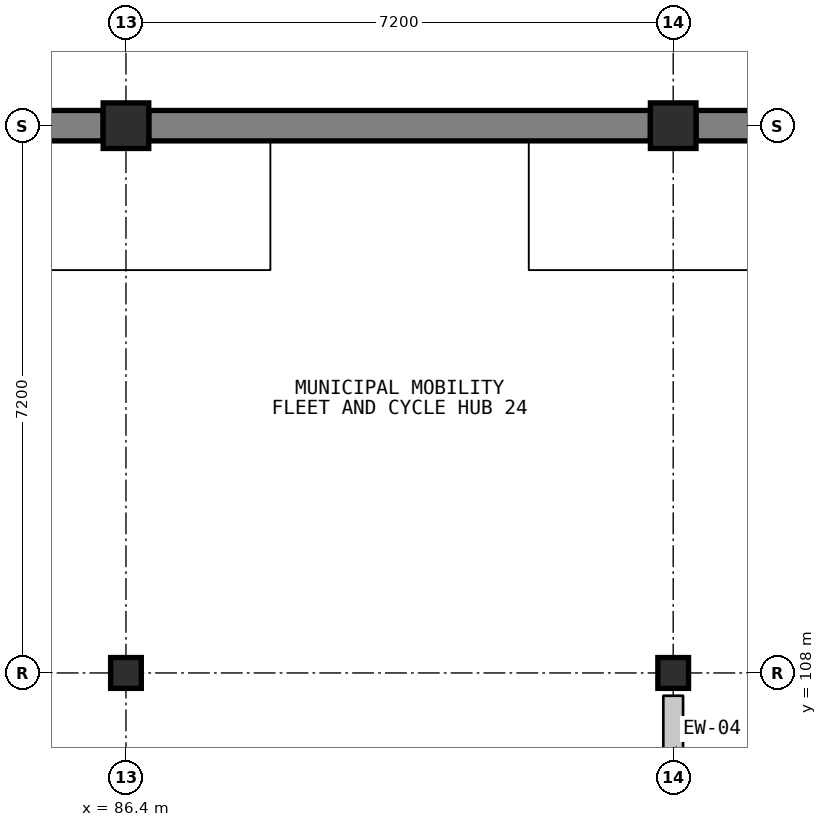
"""IFC4 building model, lengths in metres.
Left out: names, types, materials, properties, quantities, classifications, styles, units other than length and angle.
Written with IfcOpenShell. Run it as: python <this file> out.ifc"""

import sys

from ifc_helpers import new_model, si_unit, direction, frame, frame_2d, origin, origin_2d, place, context, subcontext, project, spatial, rectangle, i_section, extrude, element, save


model = new_model("IFC4")
c1 = context("Model", 3, precision=1e-05, world=origin(), true_north=direction((0.0, 1.0)))
c2 = subcontext(c1, "Body", "Model", "MODEL_VIEW")
j1 = project(units=[si_unit("LENGTHUNIT", "METRE"), si_unit("PLANEANGLEUNIT", "RADIAN")], contexts=[c1])
p1 = place(None, origin())
s1 = spatial("IfcSite", under=j1, at=p1, CompositionType="ELEMENT")
p2 = place(p1, origin())
s2 = spatial("IfcBuilding", under=s1, at=p2, CompositionType="ELEMENT")
p3 = place(p2, frame((0.0, 0.0, -4.2)))
s3 = spatial("IfcBuildingStorey", under=s2, at=p3, CompositionType="ELEMENT", Elevation=-4.2)
for number, where, z_axis, x_axis in (
    (1, (79.5, 115.2, 0.0), (0.0, 0.0, 1.0), (1.0, 0.0, 0.0)),
    (2, (86.7, 115.2, 0.0), (0.0, 0.0, 1.0), (1.0, 0.0, 0.0)),
    (3, (93.9, 115.2, 0.0), (0.0, 0.0, 1.0), (1.0, 0.0, 0.0)),
):
    element("IfcWall", number, at=place(p3, frame(where, z_axis=z_axis, x_axis=x_axis)), inside=s3, PredefinedType="USERDEFINED", context=c2, shape_type="SweptSolid", body=[
        extrude(rectangle(XDim=6.6, YDim=0.4, at=frame_2d((3.3, 0.0))), origin(), (0.0, 0.0, 1.0), 3.98),
    ])
p4 = place(p3, frame((86.4, 108.0, 0.0), z_axis=(0.0, 0.0, 1.0), x_axis=(1.0, 0.0, 0.0)))
e4 = element("IfcColumn", 4, at=p4, inside=s3, PredefinedType="COLUMN", context=c2, shape_type="SweptSolid", body=[
    extrude(i_section(OverallWidth=0.404, OverallDepth=0.406, WebThickness=0.027, FlangeThickness=0.044, FilletRadius=0.015, at=origin_2d()), origin(), (0.0, 0.0, 1.0), 4.2),
])
p5 = place(p3, frame((86.4, 115.2, 0.0), z_axis=(0.0, 0.0, 1.0), x_axis=(1.0, 0.0, 0.0)))
e5 = element("IfcColumn", 5, at=p5, inside=s3, PredefinedType="COLUMN", context=c2, shape_type="SweptSolid", body=[
    extrude(rectangle(XDim=0.6, YDim=0.6, at=origin_2d()), origin(), (0.0, 0.0, 1.0), 4.2),
])
p6 = place(p3, frame((93.6, 108.0, 0.0), z_axis=(0.0, 0.0, 1.0), x_axis=(1.0, 0.0, 0.0)))
e6 = element("IfcColumn", 6, at=p6, inside=s3, PredefinedType="COLUMN", context=c2, shape_type="SweptSolid", body=[
    extrude(i_section(OverallWidth=0.404, OverallDepth=0.406, WebThickness=0.027, FlangeThickness=0.044, FilletRadius=0.015, at=origin_2d()), origin(), (0.0, 0.0, 1.0), 4.2),
])
p7 = place(p3, frame((93.6, 115.2, 0.0), z_axis=(0.0, 0.0, 1.0), x_axis=(1.0, 0.0, 0.0)))
e7 = element("IfcColumn", 7, at=p7, inside=s3, PredefinedType="COLUMN", context=c2, shape_type="SweptSolid", body=[
    extrude(rectangle(XDim=0.6, YDim=0.6, at=origin_2d()), origin(), (0.0, 0.0, 1.0), 4.2),
])
p8 = place(p3, frame((93.6, 101.1, 0.0), z_axis=(0.0, 0.0, 1.0), x_axis=(0.0, 1.0, 0.0)))
e8 = element("IfcWall", 8, at=p8, inside=s3, PredefinedType="SOLIDWALL", context=c2, shape_type="SweptSolid", body=[
    extrude(rectangle(XDim=6.6, YDim=0.26, at=frame_2d((3.3, 0.0))), origin(), (0.0, 0.0, 1.0), 3.22),
])
p9 = place(p8, frame((1.6, 0.0, 0.0)))
e9 = element("IfcOpeningElement", 9, at=p9, cuts=e8, PredefinedType="OPENING", context=c2, shape_type="SweptSolid", body=[
    extrude(rectangle(XDim=3.4, YDim=2.95, at=frame_2d((1.7, 1.475))), frame((0.0, 0.14, 0.0), z_axis=(0.0, -1.0, 0.0), x_axis=(1.0, 0.0, 0.0)), (0.0, 0.0, 1.0), 0.28),
])
save(model, sys.argv[1])
